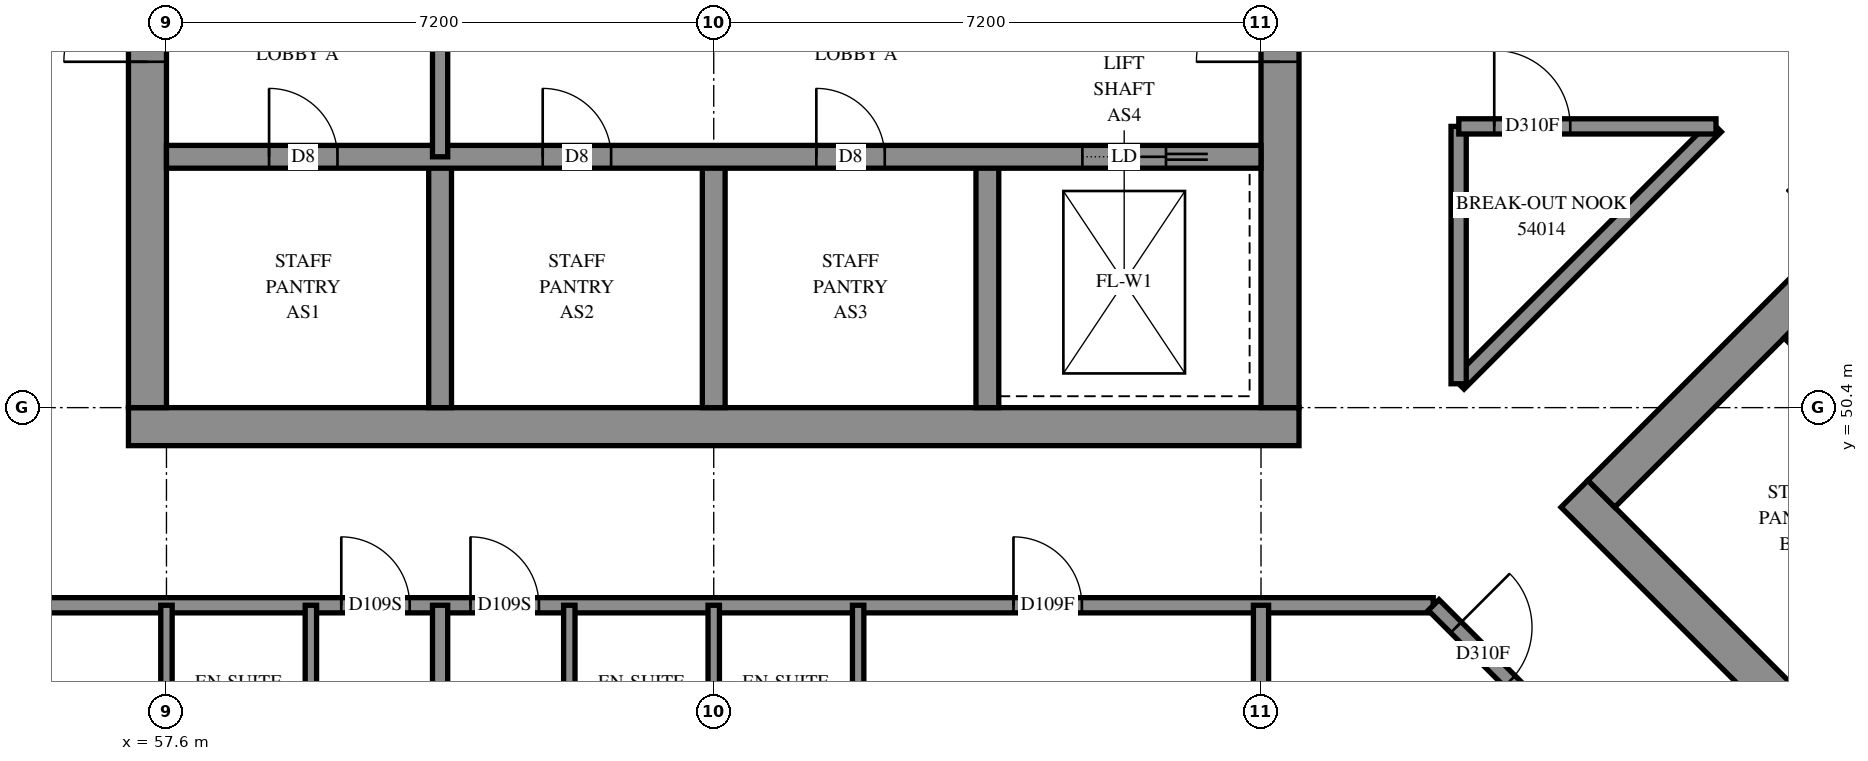
"""IFC4 building model, lengths in metres.
Left out: names, types, materials, properties, quantities, classifications, styles, units other than length and angle.
Written with IfcOpenShell. Run it as: python <this file> out.ifc"""

import sys

from ifc_helpers import new_model, si_unit, direction, frame, frame_2d, origin, place, context, subcontext, project, spatial, rectangle, extrude, element, fill, save


model = new_model("IFC4")
c1 = context("Model", 3, precision=1e-05, world=origin(), true_north=direction((0.0, 1.0)))
c2 = subcontext(c1, "Body", "Model", "MODEL_VIEW")
j1 = project(units=[si_unit("LENGTHUNIT", "METRE"), si_unit("PLANEANGLEUNIT", "RADIAN")], contexts=[c1])
p1 = place(None, origin())
s1 = spatial("IfcSite", under=j1, at=p1, CompositionType="ELEMENT")
p2 = place(p1, origin())
s2 = spatial("IfcBuilding", under=s1, at=p2, CompositionType="ELEMENT")
p3 = place(p2, frame((0.0, 0.0, 199.8)))
s3 = spatial("IfcBuildingStorey", under=s2, at=p3, CompositionType="ELEMENT", Elevation=199.8)
p4 = place(p3, frame((57.1, 50.15, -0.3), z_axis=(0.0, 0.0, 1.0), x_axis=(1.0, 0.0, 0.0)))
e1 = element("IfcWall", 1, at=p4, inside=s3, PredefinedType="SHEAR", context=c2, shape_type="SweptSolid", body=[
    extrude(rectangle(XDim=15.4, YDim=0.5, at=frame_2d((7.7, 0.0))), origin(), (0.0, 0.0, 1.0), 2.7),
])
p5 = place(p3, frame((57.35, 50.4, -0.3), z_axis=(0.0, 0.0, 1.0), x_axis=(0.0, 1.0, 0.0)))
e2 = element("IfcWall", 2, at=p5, inside=s3, PredefinedType="SHEAR", context=c2, shape_type="SweptSolid", body=[
    extrude(rectangle(XDim=14.4, YDim=0.5, at=frame_2d((7.2, 0.0))), origin(), (0.0, 0.0, 1.0), 2.7),
])
p6 = place(p5, frame((4.55, 0.0, 0.3)))
e3 = element("IfcOpeningElement", 3, at=p6, cuts=e2, PredefinedType="OPENING", context=c2, shape_type="SweptSolid", body=[
    extrude(rectangle(XDim=1.1, YDim=2.1, at=frame_2d((0.55, 1.05))), frame((0.0, 0.26, 0.0), z_axis=(0.0, -1.0, 0.0), x_axis=(1.0, 0.0, 0.0)), (0.0, 0.0, 1.0), 0.52),
])
p7 = place(p5, frame((11.35, 0.0, 0.3)))
e4 = element("IfcOpeningElement", 4, at=p7, cuts=e2, PredefinedType="OPENING", context=c2, shape_type="SweptSolid", body=[
    extrude(rectangle(XDim=1.1, YDim=2.1, at=frame_2d((0.55, 1.05))), frame((0.0, 0.26, 0.0), z_axis=(0.0, -1.0, 0.0), x_axis=(1.0, 0.0, 0.0)), (0.0, 0.0, 1.0), 0.52),
])
p8 = place(p3, frame((72.25, 50.4, -0.3), z_axis=(0.0, 0.0, 1.0), x_axis=(0.0, 1.0, 0.0)))
e5 = element("IfcWall", 5, at=p8, inside=s3, PredefinedType="SHEAR", context=c2, shape_type="SweptSolid", body=[
    extrude(rectangle(XDim=14.4, YDim=0.5, at=frame_2d((7.2, 0.0))), origin(), (0.0, 0.0, 1.0), 2.7),
])
p9 = place(p8, frame((4.55, 0.0, 0.3)))
e6 = element("IfcOpeningElement", 6, at=p9, cuts=e5, PredefinedType="OPENING", context=c2, shape_type="SweptSolid", body=[
    extrude(rectangle(XDim=1.1, YDim=2.1, at=frame_2d((0.55, 1.05))), frame((0.0, 0.26, 0.0), z_axis=(0.0, -1.0, 0.0), x_axis=(1.0, 0.0, 0.0)), (0.0, 0.0, 1.0), 0.52),
])
p10 = place(p8, frame((11.35, 0.0, 0.3)))
e7 = element("IfcOpeningElement", 7, at=p10, cuts=e5, PredefinedType="OPENING", context=c2, shape_type="SweptSolid", body=[
    extrude(rectangle(XDim=1.1, YDim=2.1, at=frame_2d((0.55, 1.05))), frame((0.0, 0.26, 0.0), z_axis=(0.0, -1.0, 0.0), x_axis=(1.0, 0.0, 0.0)), (0.0, 0.0, 1.0), 0.52),
])
for number, where, z_axis, x_axis in (
    (8, (61.2, 50.4, 0.0), (0.0, 0.0, 1.0), (0.0, 1.0, 0.0)),
    (9, (64.8, 50.4, 0.0), (0.0, 0.0, 1.0), (0.0, 1.0, 0.0)),
    (10, (68.4, 50.4, 0.0), (0.0, 0.0, 1.0), (0.0, 1.0, 0.0)),
):
    element("IfcWall", number, at=place(p3, frame(where, z_axis=z_axis, x_axis=x_axis)), inside=s3, PredefinedType="SOLIDWALL", context=c2, shape_type="SweptSolid", body=[
        extrude(rectangle(XDim=3.3, YDim=0.3, at=frame_2d((1.65, 0.0))), origin(), (0.0, 0.0, 1.0), 3.1),
    ])
p11 = place(p3, frame((57.6, 53.7, 0.0), z_axis=(0.0, 0.0, 1.0), x_axis=(1.0, 0.0, 0.0)))
e11 = element("IfcWall", 11, at=p11, inside=s3, PredefinedType="SOLIDWALL", context=c2, shape_type="SweptSolid", body=[
    extrude(rectangle(XDim=14.4, YDim=0.3, at=frame_2d((7.2, 0.0))), origin(), (0.0, 0.0, 1.0), 3.1),
])
p12 = place(p11, frame((1.35, 0.0, 0.0)))
e12 = element("IfcOpeningElement", 12, at=p12, cuts=e11, PredefinedType="OPENING", context=c2, shape_type="SweptSolid", body=[
    extrude(rectangle(XDim=0.9, YDim=2.1, at=frame_2d((0.45, 1.05))), frame((0.0, 0.16, 0.0), z_axis=(0.0, -1.0, 0.0), x_axis=(1.0, 0.0, 0.0)), (0.0, 0.0, 1.0), 0.32),
])
p13 = place(p11, frame((4.95, 0.0, 0.0)))
e13 = element("IfcOpeningElement", 13, at=p13, cuts=e11, PredefinedType="OPENING", context=c2, shape_type="SweptSolid", body=[
    extrude(rectangle(XDim=0.9, YDim=2.1, at=frame_2d((0.45, 1.05))), frame((0.0, 0.16, 0.0), z_axis=(0.0, -1.0, 0.0), x_axis=(1.0, 0.0, 0.0)), (0.0, 0.0, 1.0), 0.32),
])
p14 = place(p11, frame((8.55, 0.0, 0.0)))
e14 = element("IfcOpeningElement", 14, at=p14, cuts=e11, PredefinedType="OPENING", context=c2, shape_type="SweptSolid", body=[
    extrude(rectangle(XDim=0.9, YDim=2.1, at=frame_2d((0.45, 1.05))), frame((0.0, 0.16, 0.0), z_axis=(0.0, -1.0, 0.0), x_axis=(1.0, 0.0, 0.0)), (0.0, 0.0, 1.0), 0.32),
])
p15 = place(p11, frame((12.05, 0.0, 0.0)))
e15 = element("IfcOpeningElement", 15, at=p15, cuts=e11, PredefinedType="OPENING", context=c2, shape_type="SweptSolid", body=[
    extrude(rectangle(XDim=1.1, YDim=2.1, at=frame_2d((0.55, 1.05))), frame((0.0, 0.16, 0.0), z_axis=(0.0, -1.0, 0.0), x_axis=(1.0, 0.0, 0.0)), (0.0, 0.0, 1.0), 0.32),
])
p16 = place(p3, frame((76.124, 49.267, -0.3), z_axis=(0.0, 0.0, 1.0), x_axis=(0.7071067812, -0.7071067812, 0.0)))
e16 = element("IfcWall", 16, at=p16, inside=s3, PredefinedType="SHEAR", context=c2, shape_type="SweptSolid", body=[
    extrude(rectangle(XDim=15.4, YDim=0.5, at=frame_2d((7.7, 0.0))), origin(), (0.0, 0.0, 1.0), 2.7),
])
p17 = place(p3, frame((76.478, 49.267, -0.3), z_axis=(0.0, 0.0, 1.0), x_axis=(0.7071067812, 0.7071067812, 0.0)))
e17 = element("IfcWall", 17, at=p17, inside=s3, PredefinedType="SHEAR", context=c2, shape_type="SweptSolid", body=[
    extrude(rectangle(XDim=14.4, YDim=0.5, at=frame_2d((7.2, 0.0))), origin(), (0.0, 0.0, 1.0), 2.7),
])
p18 = place(p17, frame((4.55, 0.0, 0.3)))
e18 = element("IfcOpeningElement", 18, at=p18, cuts=e17, PredefinedType="OPENING", context=c2, shape_type="SweptSolid", body=[
    extrude(rectangle(XDim=1.1, YDim=2.1, at=frame_2d((0.55, 1.05))), frame((0.0, 0.26, 0.0), z_axis=(0.0, -1.0, 0.0), x_axis=(1.0, 0.0, 0.0)), (0.0, 0.0, 1.0), 0.52),
])
p19 = place(p17, frame((11.35, 0.0, 0.3)))
e19 = element("IfcOpeningElement", 19, at=p19, cuts=e17, PredefinedType="OPENING", context=c2, shape_type="SweptSolid", body=[
    extrude(rectangle(XDim=1.1, YDim=2.1, at=frame_2d((0.55, 1.05))), frame((0.0, 0.26, 0.0), z_axis=(0.0, -1.0, 0.0), x_axis=(1.0, 0.0, 0.0)), (0.0, 0.0, 1.0), 0.52),
])
p20 = place(p3, frame((78.988, 51.423, 0.0), z_axis=(0.0, 0.0, 1.0), x_axis=(0.7071067812, -0.7071067812, 0.0)))
e20 = element("IfcWall", 20, at=p20, inside=s3, PredefinedType="SOLIDWALL", context=c2, shape_type="SweptSolid", body=[
    extrude(rectangle(XDim=14.4, YDim=0.3, at=frame_2d((7.2, 0.0))), origin(), (0.0, 0.0, 1.0), 3.1),
])
p21 = place(p20, frame((1.35, 0.0, 0.0)))
e21 = element("IfcOpeningElement", 21, at=p21, cuts=e20, PredefinedType="OPENING", context=c2, shape_type="SweptSolid", body=[
    extrude(rectangle(XDim=0.9, YDim=2.1, at=frame_2d((0.45, 1.05))), frame((0.0, 0.16, 0.0), z_axis=(0.0, -1.0, 0.0), x_axis=(1.0, 0.0, 0.0)), (0.0, 0.0, 1.0), 0.32),
])
p22 = place(p20, frame((4.95, 0.0, 0.0)))
e22 = element("IfcOpeningElement", 22, at=p22, cuts=e20, PredefinedType="OPENING", context=c2, shape_type="SweptSolid", body=[
    extrude(rectangle(XDim=0.9, YDim=2.1, at=frame_2d((0.45, 1.05))), frame((0.0, 0.16, 0.0), z_axis=(0.0, -1.0, 0.0), x_axis=(1.0, 0.0, 0.0)), (0.0, 0.0, 1.0), 0.32),
])
p23 = place(p20, frame((8.55, 0.0, 0.0)))
e23 = element("IfcOpeningElement", 23, at=p23, cuts=e20, PredefinedType="OPENING", context=c2, shape_type="SweptSolid", body=[
    extrude(rectangle(XDim=0.9, YDim=2.1, at=frame_2d((0.45, 1.05))), frame((0.0, 0.16, 0.0), z_axis=(0.0, -1.0, 0.0), x_axis=(1.0, 0.0, 0.0)), (0.0, 0.0, 1.0), 0.32),
])
p24 = place(p20, frame((12.05, 0.0, 0.0)))
e24 = element("IfcOpeningElement", 24, at=p24, cuts=e20, PredefinedType="OPENING", context=c2, shape_type="SweptSolid", body=[
    extrude(rectangle(XDim=1.1, YDim=2.1, at=frame_2d((0.55, 1.05))), frame((0.0, 0.16, 0.0), z_axis=(0.0, -1.0, 0.0), x_axis=(1.0, 0.0, 0.0)), (0.0, 0.0, 1.0), 0.32),
])
p25 = place(p3, frame((61.2, 53.7, 0.0), z_axis=(0.0, 0.0, 1.0), x_axis=(0.0, 1.0, 0.0)))
e25 = element("IfcWall", 25, at=p25, inside=s3, PredefinedType="PARTITIONING", context=c2, shape_type="SweptSolid", body=[
    extrude(rectangle(XDim=3.6, YDim=0.2, at=frame_2d((1.8, 0.0))), origin(), (0.0, 0.0, 1.0), 3.1),
])
p26 = place(p3, frame((55.0, 47.8, 0.0), z_axis=(0.0, 0.0, 1.0), x_axis=(1.0, 0.0, 0.0)))
e26 = element("IfcWall", 26, at=p26, inside=s3, PredefinedType="PARTITIONING", context=c2, shape_type="SweptSolid", body=[
    extrude(rectangle(XDim=19.266, YDim=0.2, at=frame_2d((9.633, 0.0))), origin(), (0.0, 0.0, 1.0), 3.1),
])
p27 = place(p26, frame((4.9, 0.0, 0.0)))
e27 = element("IfcOpeningElement", 27, at=p27, cuts=e26, PredefinedType="OPENING", context=c2, shape_type="SweptSolid", body=[
    extrude(rectangle(XDim=0.9, YDim=2.1, at=frame_2d((0.45, 1.05))), frame((0.0, 0.11, 0.0), z_axis=(0.0, -1.0, 0.0), x_axis=(1.0, 0.0, 0.0)), (0.0, 0.0, 1.0), 0.22),
])
p28 = place(p26, frame((6.6, 0.0, 0.0)))
e28 = element("IfcOpeningElement", 28, at=p28, cuts=e26, PredefinedType="OPENING", context=c2, shape_type="SweptSolid", body=[
    extrude(rectangle(XDim=0.9, YDim=2.1, at=frame_2d((0.45, 1.05))), frame((0.0, 0.11, 0.0), z_axis=(0.0, -1.0, 0.0), x_axis=(1.0, 0.0, 0.0)), (0.0, 0.0, 1.0), 0.22),
])
p29 = place(p26, frame((13.743, 0.0, 0.0)))
e29 = element("IfcOpeningElement", 29, at=p29, cuts=e26, PredefinedType="OPENING", context=c2, shape_type="SweptSolid", body=[
    extrude(rectangle(XDim=0.9, YDim=2.1, at=frame_2d((0.45, 1.05))), frame((0.0, 0.11, 0.0), z_axis=(0.0, -1.0, 0.0), x_axis=(1.0, 0.0, 0.0)), (0.0, 0.0, 1.0), 0.22),
])
p30 = place(p3, frame((61.2, 42.37, 0.0), z_axis=(0.0, 0.0, 1.0), x_axis=(0.0, 1.0, 0.0)))
e30 = element("IfcWall", 30, at=p30, inside=s3, PredefinedType="PARTITIONING", context=c2, shape_type="SweptSolid", body=[
    extrude(rectangle(XDim=5.43, YDim=0.2, at=frame_2d((2.715, 0.0))), origin(), (0.0, 0.0, 1.0), 3.1),
])
p31 = place(p3, frame((74.601, 50.715, 0.0), z_axis=(0.0, 0.0, 1.0), x_axis=(0.7071067812, 0.7071067812, 0.0)))
e31 = element("IfcWall", 31, at=p31, inside=s3, PredefinedType="PARTITIONING", context=c2, shape_type="SweptSolid", body=[
    extrude(rectangle(XDim=4.786, YDim=0.2, at=frame_2d((2.393, 0.0))), origin(), (0.0, 0.0, 1.0), 3.1),
])
p32 = place(p3, frame((74.272, 47.803, 0.0), z_axis=(0.0, 0.0, 1.0), x_axis=(0.7071067812, -0.7071067812, 0.0)))
e32 = element("IfcWall", 32, at=p32, inside=s3, PredefinedType="PARTITIONING", context=c2, shape_type="SweptSolid", body=[
    extrude(rectangle(XDim=4.641, YDim=0.2, at=frame_2d((2.321, 0.0))), origin(), (0.0, 0.0, 1.0), 3.1),
])
p33 = place(p32, frame((0.416, 0.0, 0.0)))
e33 = element("IfcOpeningElement", 33, at=p33, cuts=e32, PredefinedType="OPENING", context=c2, shape_type="SweptSolid", body=[
    extrude(rectangle(XDim=1.0, YDim=2.1, at=frame_2d((0.5, 1.05))), frame((0.0, 0.11, 0.0), z_axis=(0.0, -1.0, 0.0), x_axis=(1.0, 0.0, 0.0)), (0.0, 0.0, 1.0), 0.22),
])
p34 = place(p3, frame((72.0, 43.6, 0.0), z_axis=(0.0, 0.0, 1.0), x_axis=(0.0, 1.0, 0.0)))
e34 = element("IfcWall", 34, at=p34, inside=s3, PredefinedType="PARTITIONING", context=c2, shape_type="SweptSolid", body=[
    extrude(rectangle(XDim=4.2, YDim=0.2, at=frame_2d((2.1, 0.0))), origin(), (0.0, 0.0, 1.0), 3.1),
])
p35 = place(p3, frame((74.6, 50.714, 0.0), z_axis=(0.0, 0.0, 1.0), x_axis=(0.0, 1.0, 0.0)))
e35 = element("IfcWall", 35, at=p35, inside=s3, PredefinedType="PARTITIONING", context=c2, shape_type="SweptSolid", body=[
    extrude(rectangle(XDim=3.386, YDim=0.2, at=frame_2d((1.693, 0.0))), origin(), (0.0, 0.0, 1.0), 3.1),
])
p36 = place(p3, frame((74.602, 54.1, 0.0), z_axis=(0.0, 0.0, 1.0), x_axis=(1.0, 0.0, 0.0)))
e36 = element("IfcWall", 36, at=p36, inside=s3, PredefinedType="PARTITIONING", context=c2, shape_type="SweptSolid", body=[
    extrude(rectangle(XDim=3.384, YDim=0.2, at=frame_2d((1.692, 0.0))), origin(), (0.0, 0.0, 1.0), 3.1),
])
p37 = place(p36, frame((0.467, 0.0, 0.0)))
e37 = element("IfcOpeningElement", 37, at=p37, cuts=e36, PredefinedType="OPENING", context=c2, shape_type="SweptSolid", body=[
    extrude(rectangle(XDim=1.0, YDim=2.1, at=frame_2d((0.5, 1.05))), frame((0.0, 0.11, 0.0), z_axis=(0.0, -1.0, 0.0), x_axis=(1.0, 0.0, 0.0)), (0.0, 0.0, 1.0), 0.22),
])
for number, where, z_axis, x_axis in (
    (38, (59.5, 45.4, 0.0), (0.0, 0.0, 1.0), (0.0, 1.0, 0.0)),
    (39, (57.6, 45.4, 0.0), (0.0, 0.0, 1.0), (0.0, 1.0, 0.0)),
    (40, (62.9, 45.4, 0.0), (0.0, 0.0, 1.0), (0.0, 1.0, 0.0)),
    (41, (66.7, 45.4, 0.0), (0.0, 0.0, 1.0), (0.0, 1.0, 0.0)),
    (42, (64.8, 45.4, 0.0), (0.0, 0.0, 1.0), (0.0, 1.0, 0.0)),
):
    element("IfcWall", number, at=place(p3, frame(where, z_axis=z_axis, x_axis=x_axis)), inside=s3, PredefinedType="PARTITIONING", context=c2, shape_type="SweptSolid", body=[
        extrude(rectangle(XDim=2.4, YDim=0.15, at=frame_2d((1.2, 0.0))), origin(), (0.0, 0.0, 1.0), 3.1),
    ])
p38 = place(p6, origin())
e43 = element("IfcDoor", 43, at=p38, inside=s3, OperationType="DOUBLE_DOOR_SINGLE_SWING", PredefinedType="DOOR", context=c2, shape_type="SweptSolid", body=[
    extrude(rectangle(XDim=1.1, YDim=2.1, at=frame_2d((0.55, 1.05))), frame((0.0, 0.025, 0.0), z_axis=(0.0, -1.0, 0.0), x_axis=(1.0, 0.0, 0.0)), (0.0, 0.0, 1.0), 0.05),
])
fill(e3, e43)
p39 = place(p9, origin())
e44 = element("IfcDoor", 44, at=p39, inside=s3, OperationType="DOUBLE_DOOR_SINGLE_SWING", PredefinedType="DOOR", context=c2, shape_type="SweptSolid", body=[
    extrude(rectangle(XDim=1.1, YDim=2.1, at=frame_2d((0.55, 1.05))), frame((0.0, 0.025, 0.0), z_axis=(0.0, -1.0, 0.0), x_axis=(1.0, 0.0, 0.0)), (0.0, 0.0, 1.0), 0.05),
])
fill(e6, e44)
p40 = place(p12, origin())
e45 = element("IfcDoor", 45, at=p40, inside=s3, OperationType="SINGLE_SWING_LEFT", PredefinedType="DOOR", context=c2, shape_type="SweptSolid", body=[
    extrude(rectangle(XDim=0.9, YDim=2.1, at=frame_2d((0.45, 1.05))), frame((0.0, 0.025, 0.0), z_axis=(0.0, -1.0, 0.0), x_axis=(1.0, 0.0, 0.0)), (0.0, 0.0, 1.0), 0.05),
])
fill(e12, e45)
p41 = place(p13, origin())
e46 = element("IfcDoor", 46, at=p41, inside=s3, OperationType="SINGLE_SWING_LEFT", PredefinedType="DOOR", context=c2, shape_type="SweptSolid", body=[
    extrude(rectangle(XDim=0.9, YDim=2.1, at=frame_2d((0.45, 1.05))), frame((0.0, 0.025, 0.0), z_axis=(0.0, -1.0, 0.0), x_axis=(1.0, 0.0, 0.0)), (0.0, 0.0, 1.0), 0.05),
])
fill(e13, e46)
p42 = place(p14, origin())
e47 = element("IfcDoor", 47, at=p42, inside=s3, OperationType="SINGLE_SWING_LEFT", PredefinedType="DOOR", context=c2, shape_type="SweptSolid", body=[
    extrude(rectangle(XDim=0.9, YDim=2.1, at=frame_2d((0.45, 1.05))), frame((0.0, 0.025, 0.0), z_axis=(0.0, -1.0, 0.0), x_axis=(1.0, 0.0, 0.0)), (0.0, 0.0, 1.0), 0.05),
])
fill(e14, e47)
p43 = place(p15, origin())
e48 = element("IfcDoor", 48, at=p43, inside=s3, OperationType="SLIDING_TO_RIGHT", PredefinedType="DOOR", context=c2, shape_type="SweptSolid", body=[
    extrude(rectangle(XDim=1.1, YDim=2.1, at=frame_2d((0.55, 1.05))), frame((0.0, 0.025, 0.0), z_axis=(0.0, -1.0, 0.0), x_axis=(1.0, 0.0, 0.0)), (0.0, 0.0, 1.0), 0.05),
])
fill(e15, e48)
p44 = place(p37, origin())
e49 = element("IfcDoor", 49, at=p44, inside=s3, OperationType="SINGLE_SWING_RIGHT", PredefinedType="DOOR", context=c2, shape_type="SweptSolid", body=[
    extrude(rectangle(XDim=1.0, YDim=2.1, at=frame_2d((0.5, 1.05))), frame((0.0, 0.025, 0.0), z_axis=(0.0, -1.0, 0.0), x_axis=(1.0, 0.0, 0.0)), (0.0, 0.0, 1.0), 0.05),
])
fill(e37, e49)
p45 = place(p27, origin())
e50 = element("IfcDoor", 50, at=p45, inside=s3, OperationType="SINGLE_SWING_LEFT", PredefinedType="DOOR", context=c2, shape_type="SweptSolid", body=[
    extrude(rectangle(XDim=0.9, YDim=2.1, at=frame_2d((0.45, 1.05))), frame((0.0, 0.025, 0.0), z_axis=(0.0, -1.0, 0.0), x_axis=(1.0, 0.0, 0.0)), (0.0, 0.0, 1.0), 0.05),
])
fill(e27, e50)
p46 = place(p28, origin())
e51 = element("IfcDoor", 51, at=p46, inside=s3, OperationType="SINGLE_SWING_RIGHT", PredefinedType="DOOR", context=c2, shape_type="SweptSolid", body=[
    extrude(rectangle(XDim=0.9, YDim=2.1, at=frame_2d((0.45, 1.05))), frame((0.0, 0.025, 0.0), z_axis=(0.0, -1.0, 0.0), x_axis=(1.0, 0.0, 0.0)), (0.0, 0.0, 1.0), 0.05),
])
fill(e28, e51)
p47 = place(p29, origin())
e52 = element("IfcDoor", 52, at=p47, inside=s3, OperationType="SINGLE_SWING_LEFT", PredefinedType="DOOR", context=c2, shape_type="SweptSolid", body=[
    extrude(rectangle(XDim=0.9, YDim=2.1, at=frame_2d((0.45, 1.05))), frame((0.0, 0.025, 0.0), z_axis=(0.0, -1.0, 0.0), x_axis=(1.0, 0.0, 0.0)), (0.0, 0.0, 1.0), 0.05),
])
fill(e29, e52)
p48 = place(p33, origin())
e53 = element("IfcDoor", 53, at=p48, inside=s3, OperationType="SINGLE_SWING_LEFT", PredefinedType="DOOR", context=c2, shape_type="SweptSolid", body=[
    extrude(rectangle(XDim=1.0, YDim=2.1, at=frame_2d((0.5, 1.05))), frame((0.0, 0.025, 0.0), z_axis=(0.0, -1.0, 0.0), x_axis=(1.0, 0.0, 0.0)), (0.0, 0.0, 1.0), 0.05),
])
fill(e33, e53)
save(model, sys.argv[1])
